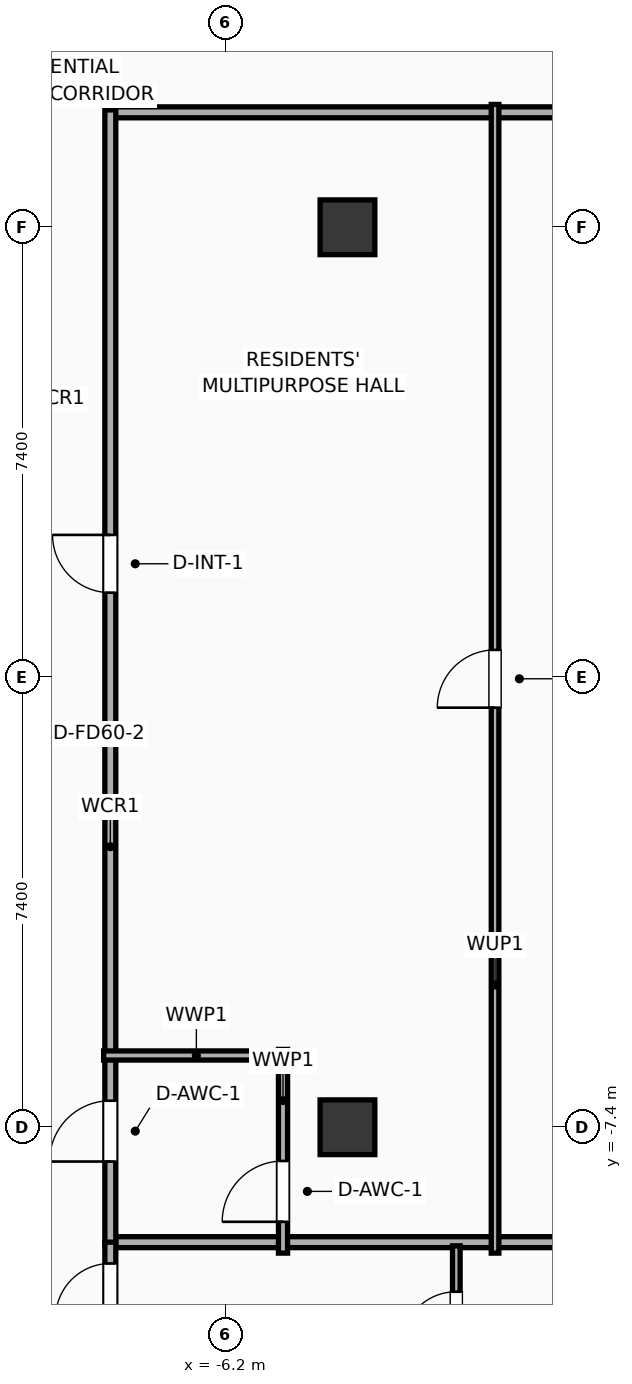
"""IFC4 building model, lengths in metres.
Left out: names, types, materials, properties, quantities, classifications, styles, units other than length and angle.
Written with IfcOpenShell. Run it as: python <this file> out.ifc"""

import sys

from ifc_helpers import new_model, si_unit, direction, frame, frame_2d, origin, origin_2d, place, context, subcontext, project, spatial, rectangle, extrude, element, fill, save


model = new_model("IFC4")
c1 = context("Model", 3, precision=1e-05, world=origin(), true_north=direction((0.0, 1.0)))
c2 = subcontext(c1, "Body", "Model", "MODEL_VIEW")
j1 = project(units=[si_unit("LENGTHUNIT", "METRE"), si_unit("PLANEANGLEUNIT", "RADIAN")], contexts=[c1])
p1 = place(None, origin())
s1 = spatial("IfcSite", under=j1, at=p1, CompositionType="ELEMENT")
p2 = place(p1, origin())
s2 = spatial("IfcBuilding", under=s1, at=p2, CompositionType="ELEMENT")
p3 = place(p2, frame((0.0, 0.0, 243.1)))
s3 = spatial("IfcBuildingStorey", under=s2, at=p3, CompositionType="ELEMENT", Elevation=243.1)
for number, where, z_axis, x_axis in (
    (1, (-4.2, -7.4, 0.0), (0.0, 0.0, 1.0), (1.0, 0.0, 0.0)),
    (2, (-4.2, 7.4, 0.0), (0.0, 0.0, 1.0), (1.0, 0.0, 0.0)),
):
    element("IfcColumn", number, at=place(p3, frame(where, z_axis=z_axis, x_axis=x_axis)), inside=s3, PredefinedType="COLUMN", context=c2, shape_type="SweptSolid", body=[
        extrude(rectangle(XDim=0.9, YDim=0.9, at=origin_2d()), origin(), (0.0, 0.0, 1.0), 3.9),
    ])
p4 = place(p3, frame((-8.15, 9.29, 0.0), z_axis=(0.0, 0.0, 1.0), x_axis=(1.0, 0.0, 0.0)))
e3 = element("IfcWall", 3, at=p4, inside=s3, PredefinedType="PARTITIONING", context=c2, shape_type="SweptSolid", body=[
    extrude(rectangle(XDim=16.3, YDim=0.18, at=frame_2d((8.15, 0.0))), origin(), (0.0, 0.0, 1.0), 3.65),
])
p5 = place(p4, frame((8.49, 0.0, 0.0)))
e4 = element("IfcOpeningElement", 4, at=p5, cuts=e3, PredefinedType="OPENING", context=c2, shape_type="SweptSolid", body=[
    extrude(rectangle(XDim=0.95, YDim=2.05, at=frame_2d((0.475, 1.025))), frame((0.0, 0.1, 0.0), z_axis=(0.0, -1.0, 0.0), x_axis=(1.0, 0.0, 0.0)), (0.0, 0.0, 1.0), 0.2),
])
p6 = place(p3, frame((-8.15, -9.29, 0.0), z_axis=(0.0, 0.0, 1.0), x_axis=(1.0, 0.0, 0.0)))
e5 = element("IfcWall", 5, at=p6, inside=s3, PredefinedType="PARTITIONING", context=c2, shape_type="SweptSolid", body=[
    extrude(rectangle(XDim=16.3, YDim=0.18, at=frame_2d((8.15, 0.0))), origin(), (0.0, 0.0, 1.0), 3.65),
])
p7 = place(p3, frame((-8.1, -9.33, 0.0), z_axis=(0.0, 0.0, 1.0), x_axis=(0.0, 1.0, 0.0)))
e6 = element("IfcWall", 6, at=p7, inside=s3, PredefinedType="PARTITIONING", context=c2, shape_type="SweptSolid", body=[
    extrude(rectangle(XDim=18.66, YDim=0.18, at=frame_2d((9.33, 0.0))), origin(), (0.0, 0.0, 1.0), 3.65),
])
p8 = place(p7, frame((1.366, 0.0, 0.0)))
e7 = element("IfcOpeningElement", 7, at=p8, cuts=e6, PredefinedType="OPENING", context=c2, shape_type="SweptSolid", body=[
    extrude(rectangle(XDim=1.0, YDim=2.05, at=frame_2d((0.5, 1.025))), frame((0.0, 0.1, 0.0), z_axis=(0.0, -1.0, 0.0), x_axis=(1.0, 0.0, 0.0)), (0.0, 0.0, 1.0), 0.2),
])
p9 = place(p7, frame((10.721, 0.0, 0.0)))
e8 = element("IfcOpeningElement", 8, at=p9, cuts=e6, PredefinedType="OPENING", context=c2, shape_type="SweptSolid", body=[
    extrude(rectangle(XDim=0.95, YDim=2.05, at=frame_2d((0.475, 1.025))), frame((0.0, 0.1, 0.0), z_axis=(0.0, -1.0, 0.0), x_axis=(1.0, 0.0, 0.0)), (0.0, 0.0, 1.0), 0.2),
])
p10 = place(p3, frame((-5.26, -9.47, 0.0), z_axis=(0.0, 0.0, 1.0), x_axis=(0.0, 1.0, 0.0)))
e9 = element("IfcWall", 9, at=p10, inside=s3, PredefinedType="PLUMBINGWALL", context=c2, shape_type="SweptSolid", body=[
    extrude(rectangle(XDim=3.35, YDim=0.15, at=frame_2d((1.675, 0.0))), origin(), (0.0, 0.0, 1.0), 3.65),
])
p11 = place(p10, frame((0.515, 0.0, 0.0)))
e10 = element("IfcOpeningElement", 10, at=p11, cuts=e9, PredefinedType="OPENING", context=c2, shape_type="SweptSolid", body=[
    extrude(rectangle(XDim=1.0, YDim=2.05, at=frame_2d((0.5, 1.025))), frame((0.0, 0.085, 0.0), z_axis=(0.0, -1.0, 0.0), x_axis=(1.0, 0.0, 0.0)), (0.0, 0.0, 1.0), 0.17),
])
p12 = place(p3, frame((-8.21, -6.22, 0.0), z_axis=(0.0, 0.0, 1.0), x_axis=(1.0, 0.0, 0.0)))
e11 = element("IfcWall", 11, at=p12, inside=s3, PredefinedType="PLUMBINGWALL", context=c2, shape_type="SweptSolid", body=[
    extrude(rectangle(XDim=3.05, YDim=0.15, at=frame_2d((1.525, 0.0))), origin(), (0.0, 0.0, 1.0), 3.65),
])
p13 = place(p3, frame((-1.773, -9.47, 0.0), z_axis=(0.0, 0.0, 1.0), x_axis=(0.0, 1.0, 0.0)))
e12 = element("IfcWall", 12, at=p13, inside=s3, PredefinedType="PARTITIONING", context=c2, shape_type="SweptSolid", body=[
    extrude(rectangle(XDim=18.89, YDim=0.125, at=frame_2d((9.445, 0.0))), origin(), (0.0, 0.0, 1.0), 3.65),
])
p14 = place(p13, frame((8.97, 0.0, 0.0)))
e13 = element("IfcOpeningElement", 13, at=p14, cuts=e12, PredefinedType="OPENING", context=c2, shape_type="SweptSolid", body=[
    extrude(rectangle(XDim=0.95, YDim=2.05, at=frame_2d((0.475, 1.025))), frame((0.0, 0.073, 0.0), z_axis=(0.0, -1.0, 0.0), x_axis=(1.0, 0.0, 0.0)), (0.0, 0.0, 1.0), 0.145),
])
p15 = place(p3, frame((-2.41, -11.76, 0.0), z_axis=(0.0, 0.0, 1.0), x_axis=(0.0, 1.0, 0.0)))
e14 = element("IfcWall", 14, at=p15, inside=s3, PredefinedType="PARTITIONING", context=c2, shape_type="SweptSolid", body=[
    extrude(rectangle(XDim=2.41, YDim=0.125, at=frame_2d((1.205, 0.0))), origin(), (0.0, 0.0, 1.0), 3.65),
])
p16 = place(p15, frame((0.755, 0.0, 0.0)))
e15 = element("IfcOpeningElement", 15, at=p16, cuts=e14, PredefinedType="OPENING", context=c2, shape_type="SweptSolid", body=[
    extrude(rectangle(XDim=0.9, YDim=2.05, at=frame_2d((0.45, 1.025))), frame((0.0, 0.073, 0.0), z_axis=(0.0, -1.0, 0.0), x_axis=(1.0, 0.0, 0.0)), (0.0, 0.0, 1.0), 0.145),
])
p17 = place(p3, frame((-8.1, -18.83, 0.0), z_axis=(0.0, 0.0, 1.0), x_axis=(0.0, 1.0, 0.0)))
e16 = element("IfcWall", 16, at=p17, inside=s3, PredefinedType="PARTITIONING", context=c2, shape_type="SweptSolid", body=[
    extrude(rectangle(XDim=9.54, YDim=0.18, at=frame_2d((4.77, 0.0))), origin(), (0.0, 0.0, 1.0), 3.65),
])
p18 = place(p17, frame((8.29, 0.0, 0.0)))
e17 = element("IfcOpeningElement", 17, at=p18, cuts=e16, PredefinedType="OPENING", context=c2, shape_type="SweptSolid", body=[
    extrude(rectangle(XDim=0.9, YDim=2.05, at=frame_2d((0.45, 1.025))), frame((0.0, 0.1, 0.0), z_axis=(0.0, -1.0, 0.0), x_axis=(1.0, 0.0, 0.0)), (0.0, 0.0, 1.0), 0.2),
])
p19 = place(p8, origin())
e18 = element("IfcDoor", 18, at=p19, inside=s3, OperationType="SINGLE_SWING_LEFT", PredefinedType="DOOR", context=c2, shape_type="SweptSolid", body=[
    extrude(rectangle(XDim=1.0, YDim=2.05, at=frame_2d((0.5, 1.025))), frame((0.0, 0.025, 0.0), z_axis=(0.0, -1.0, 0.0), x_axis=(1.0, 0.0, 0.0)), (0.0, 0.0, 1.0), 0.05),
])
fill(e7, e18)
p20 = place(p9, origin())
e19 = element("IfcDoor", 19, at=p20, inside=s3, OperationType="SINGLE_SWING_RIGHT", PredefinedType="DOOR", context=c2, shape_type="SweptSolid", body=[
    extrude(rectangle(XDim=0.95, YDim=2.05, at=frame_2d((0.475, 1.025))), frame((0.0, 0.025, 0.0), z_axis=(0.0, -1.0, 0.0), x_axis=(1.0, 0.0, 0.0)), (0.0, 0.0, 1.0), 0.05),
])
fill(e8, e19)
p21 = place(p11, origin())
e20 = element("IfcDoor", 20, at=p21, inside=s3, OperationType="SINGLE_SWING_LEFT", PredefinedType="DOOR", context=c2, shape_type="SweptSolid", body=[
    extrude(rectangle(XDim=1.0, YDim=2.05, at=frame_2d((0.5, 1.025))), frame((0.0, 0.025, 0.0), z_axis=(0.0, -1.0, 0.0), x_axis=(1.0, 0.0, 0.0)), (0.0, 0.0, 1.0), 0.05),
])
fill(e10, e20)
p22 = place(p14, origin())
e21 = element("IfcDoor", 21, at=p22, inside=s3, OperationType="SINGLE_SWING_LEFT", PredefinedType="DOOR", context=c2, shape_type="SweptSolid", body=[
    extrude(rectangle(XDim=0.95, YDim=2.05, at=frame_2d((0.475, 1.025))), frame((0.0, 0.025, 0.0), z_axis=(0.0, -1.0, 0.0), x_axis=(1.0, 0.0, 0.0)), (0.0, 0.0, 1.0), 0.05),
])
fill(e13, e21)
p23 = place(p16, origin())
e22 = element("IfcDoor", 22, at=p23, inside=s3, OperationType="SINGLE_SWING_LEFT", PredefinedType="DOOR", context=c2, shape_type="SweptSolid", body=[
    extrude(rectangle(XDim=0.9, YDim=2.05, at=frame_2d((0.45, 1.025))), frame((0.0, 0.025, 0.0), z_axis=(0.0, -1.0, 0.0), x_axis=(1.0, 0.0, 0.0)), (0.0, 0.0, 1.0), 0.05),
])
fill(e15, e22)
p24 = place(p18, origin())
e23 = element("IfcDoor", 23, at=p24, inside=s3, OperationType="SINGLE_SWING_LEFT", PredefinedType="DOOR", context=c2, shape_type="SweptSolid", body=[
    extrude(rectangle(XDim=0.9, YDim=2.05, at=frame_2d((0.45, 1.025))), frame((0.0, 0.025, 0.0), z_axis=(0.0, -1.0, 0.0), x_axis=(1.0, 0.0, 0.0)), (0.0, 0.0, 1.0), 0.05),
])
fill(e17, e23)
save(model, sys.argv[1])
